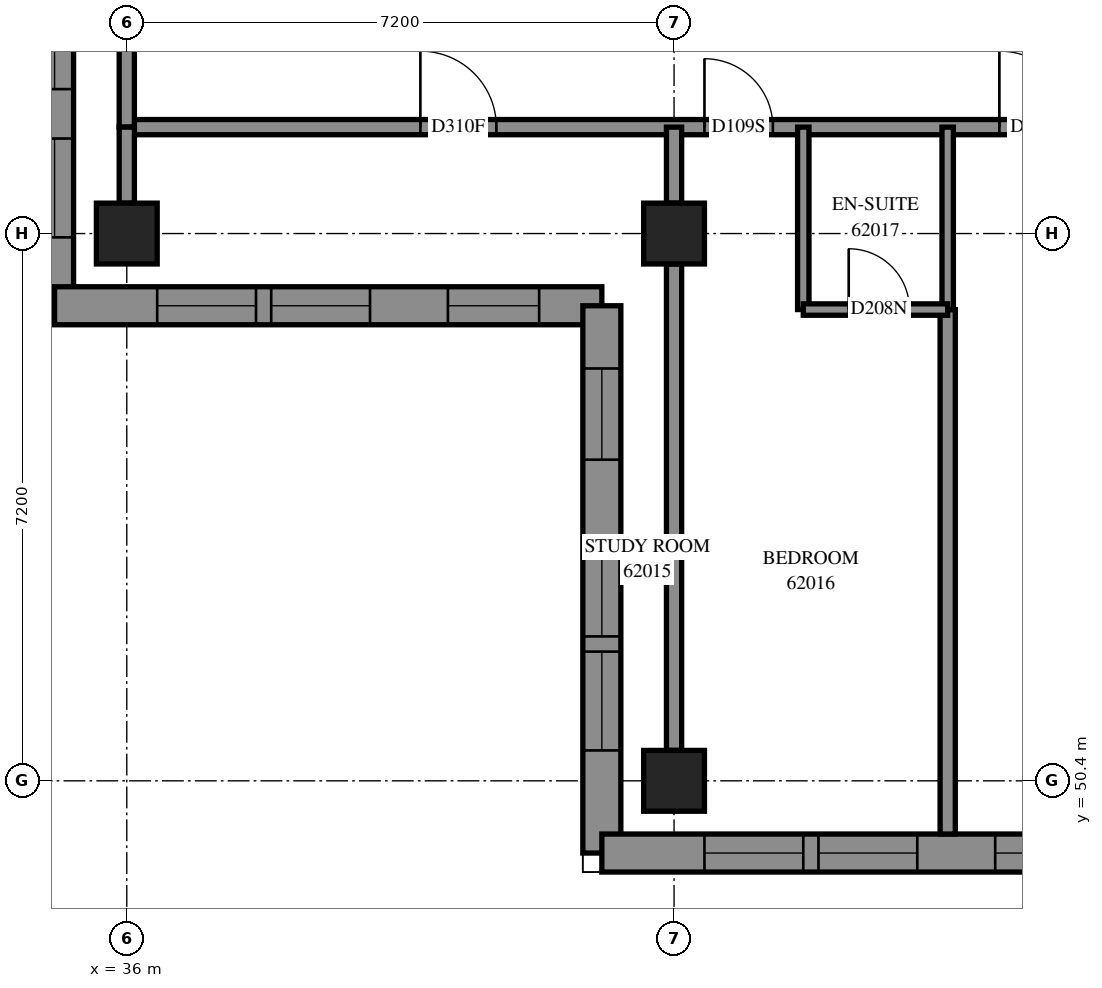
"""IFC4 building model, lengths in metres.
Left out: names, types, materials, properties, quantities, classifications, styles, units other than length and angle.
Written with IfcOpenShell. Run it as: python <this file> out.ifc"""

import sys

from ifc_helpers import new_model, si_unit, direction, frame, frame_2d, origin, origin_2d, place, context, subcontext, project, spatial, polyline, rectangle, outline, extrude, element, fill, save


model = new_model("IFC4")
c1 = context("Model", 3, precision=1e-05, world=origin(), true_north=direction((0.0, 1.0)))
c2 = subcontext(c1, "Body", "Model", "MODEL_VIEW")
j1 = project(units=[si_unit("LENGTHUNIT", "METRE"), si_unit("PLANEANGLEUNIT", "RADIAN")], contexts=[c1])
p1 = place(None, origin())
s1 = spatial("IfcSite", under=j1, at=p1, CompositionType="ELEMENT")
p2 = place(p1, origin())
s2 = spatial("IfcBuilding", under=s1, at=p2, CompositionType="ELEMENT")
p3 = place(p2, frame((0.0, 0.0, 227.0)))
s3 = spatial("IfcBuildingStorey", under=s2, at=p3, CompositionType="ELEMENT", Elevation=227.0)
for number, where, z_axis, x_axis in (
    (1, (36.0, 57.6, 0.0), (0.0, 0.0, 1.0), (1.0, 0.0, 0.0)),
    (2, (43.2, 50.4, 0.0), (0.0, 0.0, 1.0), (1.0, 0.0, 0.0)),
    (3, (43.2, 57.6, 0.0), (0.0, 0.0, 1.0), (1.0, 0.0, 0.0)),
):
    element("IfcColumn", number, at=place(p3, frame(where, z_axis=z_axis, x_axis=x_axis)), inside=s3, PredefinedType="COLUMN", context=c2, shape_type="SweptSolid", body=[
        extrude(rectangle(XDim=0.8, YDim=0.8, at=origin_2d()), origin(), (0.0, 0.0, 1.0), 3.1),
    ])
p4 = place(p3, frame((35.05, 63.85, 0.0), z_axis=(0.0, 0.0, 1.0), x_axis=(0.0, -1.0, 0.0)))
e4 = element("IfcWall", 4, at=p4, inside=s3, PredefinedType="SOLIDWALL", context=c2, shape_type="SweptSolid", body=[
    extrude(outline(polyline([(0.25, -0.25), (7.45, -0.25), (6.95, 0.25), (-0.25, 0.25), (0.25, -0.25)])), origin(), (0.0, 0.0, 1.0), 3.1),
])
p5 = place(p4, frame((3.05, 0.0, 0.45)))
e5 = element("IfcOpeningElement", 5, at=p5, cuts=e4, PredefinedType="OPENING", context=c2, shape_type="SweptSolid", body=[
    extrude(rectangle(XDim=1.3, YDim=2.5, at=frame_2d((0.65, 1.25))), frame((0.0, 0.26, 0.0), z_axis=(0.0, -1.0, 0.0), x_axis=(1.0, 0.0, 0.0)), (0.0, 0.0, 1.0), 0.52),
])
p6 = place(p4, frame((5.0, 0.0, 0.45)))
e6 = element("IfcOpeningElement", 6, at=p6, cuts=e4, PredefinedType="OPENING", context=c2, shape_type="SweptSolid", body=[
    extrude(rectangle(XDim=1.3, YDim=2.5, at=frame_2d((0.65, 1.25))), frame((0.0, 0.26, 0.0), z_axis=(0.0, -1.0, 0.0), x_axis=(1.0, 0.0, 0.0)), (0.0, 0.0, 1.0), 0.52),
])
p7 = place(p4, frame((0.825, 0.0, 0.45)))
e7 = element("IfcOpeningElement", 7, at=p7, cuts=e4, PredefinedType="OPENING", context=c2, shape_type="SweptSolid", body=[
    extrude(rectangle(XDim=1.2, YDim=2.5, at=frame_2d((0.6, 1.25))), frame((0.0, 0.26, 0.0), z_axis=(0.0, -1.0, 0.0), x_axis=(1.0, 0.0, 0.0)), (0.0, 0.0, 1.0), 0.52),
])
p8 = place(p3, frame((35.05, 56.65, 0.0), z_axis=(0.0, 0.0, 1.0), x_axis=(1.0, 0.0, 0.0)))
e8 = element("IfcWall", 8, at=p8, inside=s3, PredefinedType="SOLIDWALL", context=c2, shape_type="SweptSolid", body=[
    extrude(outline(polyline([(-0.25, -0.25), (6.95, -0.25), (7.45, 0.25), (0.25, 0.25), (-0.25, -0.25)])), origin(), (0.0, 0.0, 1.0), 3.1),
])
p9 = place(p8, frame((1.35, 0.0, 0.45)))
e9 = element("IfcOpeningElement", 9, at=p9, cuts=e8, PredefinedType="OPENING", context=c2, shape_type="SweptSolid", body=[
    extrude(rectangle(XDim=1.3, YDim=2.5, at=frame_2d((0.65, 1.25))), frame((0.0, 0.26, 0.0), z_axis=(0.0, -1.0, 0.0), x_axis=(1.0, 0.0, 0.0)), (0.0, 0.0, 1.0), 0.52),
])
p10 = place(p8, frame((2.85, 0.0, 0.45)))
e10 = element("IfcOpeningElement", 10, at=p10, cuts=e8, PredefinedType="OPENING", context=c2, shape_type="SweptSolid", body=[
    extrude(rectangle(XDim=1.3, YDim=2.5, at=frame_2d((0.65, 1.25))), frame((0.0, 0.26, 0.0), z_axis=(0.0, -1.0, 0.0), x_axis=(1.0, 0.0, 0.0)), (0.0, 0.0, 1.0), 0.52),
])
p11 = place(p8, frame((5.175, 0.0, 0.45)))
e11 = element("IfcOpeningElement", 11, at=p11, cuts=e8, PredefinedType="OPENING", context=c2, shape_type="SweptSolid", body=[
    extrude(rectangle(XDim=1.2, YDim=2.5, at=frame_2d((0.6, 1.25))), frame((0.0, 0.26, 0.0), z_axis=(0.0, -1.0, 0.0), x_axis=(1.0, 0.0, 0.0)), (0.0, 0.0, 1.0), 0.52),
])
p12 = place(p3, frame((42.25, 56.65, 0.0), z_axis=(0.0, 0.0, 1.0), x_axis=(0.0, -1.0, 0.0)))
e12 = element("IfcWall", 12, at=p12, inside=s3, PredefinedType="SOLIDWALL", context=c2, shape_type="SweptSolid", body=[
    extrude(outline(polyline([(0.25, -0.25), (7.45, -0.25), (6.95, 0.25), (-0.25, 0.25), (0.25, -0.25)])), origin(), (0.0, 0.0, 1.0), 3.1),
])
p13 = place(p12, frame((3.05, 0.0, 0.45)))
e13 = element("IfcOpeningElement", 13, at=p13, cuts=e12, PredefinedType="OPENING", context=c2, shape_type="SweptSolid", body=[
    extrude(rectangle(XDim=1.3, YDim=2.5, at=frame_2d((0.65, 1.25))), frame((0.0, 0.26, 0.0), z_axis=(0.0, -1.0, 0.0), x_axis=(1.0, 0.0, 0.0)), (0.0, 0.0, 1.0), 0.52),
])
p14 = place(p12, frame((4.55, 0.0, 0.45)))
e14 = element("IfcOpeningElement", 14, at=p14, cuts=e12, PredefinedType="OPENING", context=c2, shape_type="SweptSolid", body=[
    extrude(rectangle(XDim=1.3, YDim=2.5, at=frame_2d((0.65, 1.25))), frame((0.0, 0.26, 0.0), z_axis=(0.0, -1.0, 0.0), x_axis=(1.0, 0.0, 0.0)), (0.0, 0.0, 1.0), 0.52),
])
p15 = place(p12, frame((0.825, 0.0, 0.45)))
e15 = element("IfcOpeningElement", 15, at=p15, cuts=e12, PredefinedType="OPENING", context=c2, shape_type="SweptSolid", body=[
    extrude(rectangle(XDim=1.2, YDim=2.5, at=frame_2d((0.6, 1.25))), frame((0.0, 0.26, 0.0), z_axis=(0.0, -1.0, 0.0), x_axis=(1.0, 0.0, 0.0)), (0.0, 0.0, 1.0), 0.52),
])
p16 = place(p3, frame((42.25, 49.45, 0.0), z_axis=(0.0, 0.0, 1.0), x_axis=(1.0, 0.0, 0.0)))
e16 = element("IfcWall", 16, at=p16, inside=s3, PredefinedType="SOLIDWALL", context=c2, shape_type="SweptSolid", body=[
    extrude(outline(polyline([(-0.25, -0.25), (6.95, -0.25), (7.45, 0.25), (0.25, 0.25), (-0.25, -0.25)])), origin(), (0.0, 0.0, 1.0), 3.1),
])
p17 = place(p16, frame((1.35, 0.0, 0.45)))
e17 = element("IfcOpeningElement", 17, at=p17, cuts=e16, PredefinedType="OPENING", context=c2, shape_type="SweptSolid", body=[
    extrude(rectangle(XDim=1.3, YDim=2.5, at=frame_2d((0.65, 1.25))), frame((0.0, 0.26, 0.0), z_axis=(0.0, -1.0, 0.0), x_axis=(1.0, 0.0, 0.0)), (0.0, 0.0, 1.0), 0.52),
])
p18 = place(p16, frame((2.85, 0.0, 0.45)))
e18 = element("IfcOpeningElement", 18, at=p18, cuts=e16, PredefinedType="OPENING", context=c2, shape_type="SweptSolid", body=[
    extrude(rectangle(XDim=1.3, YDim=2.5, at=frame_2d((0.65, 1.25))), frame((0.0, 0.26, 0.0), z_axis=(0.0, -1.0, 0.0), x_axis=(1.0, 0.0, 0.0)), (0.0, 0.0, 1.0), 0.52),
])
p19 = place(p16, frame((5.175, 0.0, 0.45)))
e19 = element("IfcOpeningElement", 19, at=p19, cuts=e16, PredefinedType="OPENING", context=c2, shape_type="SweptSolid", body=[
    extrude(rectangle(XDim=1.2, YDim=2.5, at=frame_2d((0.6, 1.25))), frame((0.0, 0.26, 0.0), z_axis=(0.0, -1.0, 0.0), x_axis=(1.0, 0.0, 0.0)), (0.0, 0.0, 1.0), 0.52),
])
p20 = place(p3, frame((36.0, 59.0, 0.0), z_axis=(0.0, 0.0, 1.0), x_axis=(1.0, 0.0, 0.0)))
e20 = element("IfcWall", 20, at=p20, inside=s3, PredefinedType="PARTITIONING", context=c2, shape_type="SweptSolid", body=[
    extrude(rectangle(XDim=17.0, YDim=0.2, at=frame_2d((8.5, 0.0))), origin(), (0.0, 0.0, 1.0), 3.1),
])
p21 = place(p20, frame((3.862, 0.0, 0.0)))
e21 = element("IfcOpeningElement", 21, at=p21, cuts=e20, PredefinedType="OPENING", context=c2, shape_type="SweptSolid", body=[
    extrude(rectangle(XDim=1.0, YDim=2.1, at=frame_2d((0.5, 1.05))), frame((0.0, 0.11, 0.0), z_axis=(0.0, -1.0, 0.0), x_axis=(1.0, 0.0, 0.0)), (0.0, 0.0, 1.0), 0.22),
])
p22 = place(p20, frame((7.6, 0.0, 0.0)))
e22 = element("IfcOpeningElement", 22, at=p22, cuts=e20, PredefinedType="OPENING", context=c2, shape_type="SweptSolid", body=[
    extrude(rectangle(XDim=0.9, YDim=2.1, at=frame_2d((0.45, 1.05))), frame((0.0, 0.11, 0.0), z_axis=(0.0, -1.0, 0.0), x_axis=(1.0, 0.0, 0.0)), (0.0, 0.0, 1.0), 0.22),
])
p23 = place(p20, frame((11.48, 0.0, 0.0)))
e23 = element("IfcOpeningElement", 23, at=p23, cuts=e20, PredefinedType="OPENING", context=c2, shape_type="SweptSolid", body=[
    extrude(rectangle(XDim=1.0, YDim=2.1, at=frame_2d((0.5, 1.05))), frame((0.0, 0.11, 0.0), z_axis=(0.0, -1.0, 0.0), x_axis=(1.0, 0.0, 0.0)), (0.0, 0.0, 1.0), 0.22),
])
p24 = place(p20, frame((15.805, 0.0, 0.0)))
e24 = element("IfcOpeningElement", 24, at=p24, cuts=e20, PredefinedType="OPENING", context=c2, shape_type="SweptSolid", body=[
    extrude(rectangle(XDim=1.0, YDim=2.1, at=frame_2d((0.5, 1.05))), frame((0.0, 0.11, 0.0), z_axis=(0.0, -1.0, 0.0), x_axis=(1.0, 0.0, 0.0)), (0.0, 0.0, 1.0), 0.22),
])
p25 = place(p3, frame((46.8, 49.7, 0.0), z_axis=(0.0, 0.0, 1.0), x_axis=(0.0, 1.0, 0.0)))
e25 = element("IfcWall", 25, at=p25, inside=s3, PredefinedType="PARTITIONING", context=c2, shape_type="SweptSolid", body=[
    extrude(rectangle(XDim=6.9, YDim=0.2, at=frame_2d((3.45, 0.0))), origin(), (0.0, 0.0, 1.0), 3.1),
])
p26 = place(p3, frame((43.2, 50.8, 0.0), z_axis=(0.0, 0.0, 1.0), x_axis=(0.0, 1.0, 0.0)))
e26 = element("IfcWall", 26, at=p26, inside=s3, PredefinedType="PARTITIONING", context=c2, shape_type="SweptSolid", body=[
    extrude(rectangle(XDim=6.4, YDim=0.2, at=frame_2d((3.2, 0.0))), origin(), (0.0, 0.0, 1.0), 2.6),
])
for number, where, z_axis, x_axis in (
    (27, (44.9, 56.6, 0.0), (0.0, 0.0, 1.0), (0.0, 1.0, 0.0)),
    (28, (46.8, 56.6, 0.0), (0.0, 0.0, 1.0), (0.0, 1.0, 0.0)),
):
    element("IfcWall", number, at=place(p3, frame(where, z_axis=z_axis, x_axis=x_axis)), inside=s3, PredefinedType="PARTITIONING", context=c2, shape_type="SweptSolid", body=[
        extrude(rectangle(XDim=2.4, YDim=0.15, at=frame_2d((1.2, 0.0))), origin(), (0.0, 0.0, 1.0), 3.1),
    ])
p27 = place(p3, frame((36.0, 59.0, 0.0), z_axis=(0.0, 0.0, 1.0), x_axis=(0.0, 1.0, 0.0)))
e29 = element("IfcWall", 29, at=p27, inside=s3, PredefinedType="PARTITIONING", context=c2, shape_type="SweptSolid", body=[
    extrude(rectangle(XDim=2.0, YDim=0.2, at=frame_2d((1.0, 0.0))), origin(), (0.0, 0.0, 1.0), 2.6),
])
p28 = place(p3, frame((44.9, 56.6, 0.0), z_axis=(0.0, 0.0, 1.0), x_axis=(1.0, 0.0, 0.0)))
e30 = element("IfcWall", 30, at=p28, inside=s3, PredefinedType="PARTITIONING", context=c2, shape_type="SweptSolid", body=[
    extrude(rectangle(XDim=1.9, YDim=0.15, at=frame_2d((0.95, 0.0))), origin(), (0.0, 0.0, 1.0), 3.1),
])
p29 = place(p28, frame((0.598, 0.0, 0.0)))
e31 = element("IfcOpeningElement", 31, at=p29, cuts=e30, PredefinedType="OPENING", context=c2, shape_type="SweptSolid", body=[
    extrude(rectangle(XDim=0.8, YDim=2.1, at=frame_2d((0.4, 1.05))), frame((0.0, 0.085, 0.0), z_axis=(0.0, -1.0, 0.0), x_axis=(1.0, 0.0, 0.0)), (0.0, 0.0, 1.0), 0.17),
])
p30 = place(p3, frame((36.0, 58.0, 0.0), z_axis=(0.0, 0.0, 1.0), x_axis=(0.0, 1.0, 0.0)))
e32 = element("IfcWall", 32, at=p30, inside=s3, PredefinedType="PARTITIONING", context=c2, shape_type="SweptSolid", body=[
    extrude(rectangle(XDim=1.0, YDim=0.2, at=frame_2d((0.5, 0.0))), origin(), (0.0, 0.0, 1.0), 2.6),
])
p31 = place(p3, frame((43.2, 58.0, 0.0), z_axis=(0.0, 0.0, 1.0), x_axis=(0.0, 1.0, 0.0)))
e33 = element("IfcWall", 33, at=p31, inside=s3, PredefinedType="PARTITIONING", context=c2, shape_type="SweptSolid", body=[
    extrude(rectangle(XDim=1.0, YDim=0.2, at=frame_2d((0.5, 0.0))), origin(), (0.0, 0.0, 1.0), 3.1),
])
p32 = place(p5, origin())
e34 = element("IfcWindow", 34, at=p32, inside=s3, PartitioningType="SINGLE_PANEL", PredefinedType="WINDOW", context=c2, shape_type="SweptSolid", body=[
    extrude(rectangle(XDim=1.3, YDim=2.5, at=frame_2d((0.65, 1.25))), frame((0.0, 0.18, 0.0), z_axis=(0.0, -1.0, 0.0), x_axis=(1.0, 0.0, 0.0)), (0.0, 0.0, 1.0), 0.06),
])
fill(e5, e34)
p33 = place(p6, origin())
e35 = element("IfcWindow", 35, at=p33, inside=s3, PartitioningType="SINGLE_PANEL", PredefinedType="WINDOW", context=c2, shape_type="SweptSolid", body=[
    extrude(rectangle(XDim=1.3, YDim=2.5, at=frame_2d((0.65, 1.25))), frame((0.0, 0.18, 0.0), z_axis=(0.0, -1.0, 0.0), x_axis=(1.0, 0.0, 0.0)), (0.0, 0.0, 1.0), 0.06),
])
fill(e6, e35)
p34 = place(p9, origin())
e36 = element("IfcWindow", 36, at=p34, inside=s3, PartitioningType="SINGLE_PANEL", PredefinedType="WINDOW", context=c2, shape_type="SweptSolid", body=[
    extrude(rectangle(XDim=1.3, YDim=2.5, at=frame_2d((0.65, 1.25))), frame((0.0, 0.18, 0.0), z_axis=(0.0, -1.0, 0.0), x_axis=(1.0, 0.0, 0.0)), (0.0, 0.0, 1.0), 0.06),
])
fill(e9, e36)
p35 = place(p10, origin())
e37 = element("IfcWindow", 37, at=p35, inside=s3, PartitioningType="SINGLE_PANEL", PredefinedType="WINDOW", context=c2, shape_type="SweptSolid", body=[
    extrude(rectangle(XDim=1.3, YDim=2.5, at=frame_2d((0.65, 1.25))), frame((0.0, 0.18, 0.0), z_axis=(0.0, -1.0, 0.0), x_axis=(1.0, 0.0, 0.0)), (0.0, 0.0, 1.0), 0.06),
])
fill(e10, e37)
p36 = place(p11, origin())
e38 = element("IfcWindow", 38, at=p36, inside=s3, PartitioningType="SINGLE_PANEL", PredefinedType="WINDOW", context=c2, shape_type="SweptSolid", body=[
    extrude(rectangle(XDim=1.2, YDim=2.5, at=frame_2d((0.6, 1.25))), frame((0.0, 0.18, 0.0), z_axis=(0.0, -1.0, 0.0), x_axis=(1.0, 0.0, 0.0)), (0.0, 0.0, 1.0), 0.06),
])
fill(e11, e38)
p37 = place(p13, origin())
e39 = element("IfcWindow", 39, at=p37, inside=s3, PartitioningType="SINGLE_PANEL", PredefinedType="WINDOW", context=c2, shape_type="SweptSolid", body=[
    extrude(rectangle(XDim=1.3, YDim=2.5, at=frame_2d((0.65, 1.25))), frame((0.0, 0.18, 0.0), z_axis=(0.0, -1.0, 0.0), x_axis=(1.0, 0.0, 0.0)), (0.0, 0.0, 1.0), 0.06),
])
fill(e13, e39)
p38 = place(p14, origin())
e40 = element("IfcWindow", 40, at=p38, inside=s3, PartitioningType="SINGLE_PANEL", PredefinedType="WINDOW", context=c2, shape_type="SweptSolid", body=[
    extrude(rectangle(XDim=1.3, YDim=2.5, at=frame_2d((0.65, 1.25))), frame((0.0, 0.18, 0.0), z_axis=(0.0, -1.0, 0.0), x_axis=(1.0, 0.0, 0.0)), (0.0, 0.0, 1.0), 0.06),
])
fill(e14, e40)
p39 = place(p15, origin())
e41 = element("IfcWindow", 41, at=p39, inside=s3, PartitioningType="SINGLE_PANEL", PredefinedType="WINDOW", context=c2, shape_type="SweptSolid", body=[
    extrude(rectangle(XDim=1.2, YDim=2.5, at=frame_2d((0.6, 1.25))), frame((0.0, 0.18, 0.0), z_axis=(0.0, -1.0, 0.0), x_axis=(1.0, 0.0, 0.0)), (0.0, 0.0, 1.0), 0.06),
])
fill(e15, e41)
p40 = place(p17, origin())
e42 = element("IfcWindow", 42, at=p40, inside=s3, PartitioningType="SINGLE_PANEL", PredefinedType="WINDOW", context=c2, shape_type="SweptSolid", body=[
    extrude(rectangle(XDim=1.3, YDim=2.5, at=frame_2d((0.65, 1.25))), frame((0.0, 0.18, 0.0), z_axis=(0.0, -1.0, 0.0), x_axis=(1.0, 0.0, 0.0)), (0.0, 0.0, 1.0), 0.06),
])
fill(e17, e42)
p41 = place(p18, origin())
e43 = element("IfcWindow", 43, at=p41, inside=s3, PartitioningType="SINGLE_PANEL", PredefinedType="WINDOW", context=c2, shape_type="SweptSolid", body=[
    extrude(rectangle(XDim=1.3, YDim=2.5, at=frame_2d((0.65, 1.25))), frame((0.0, 0.18, 0.0), z_axis=(0.0, -1.0, 0.0), x_axis=(1.0, 0.0, 0.0)), (0.0, 0.0, 1.0), 0.06),
])
fill(e18, e43)
p42 = place(p19, origin())
e44 = element("IfcWindow", 44, at=p42, inside=s3, PartitioningType="SINGLE_PANEL", PredefinedType="WINDOW", context=c2, shape_type="SweptSolid", body=[
    extrude(rectangle(XDim=1.2, YDim=2.5, at=frame_2d((0.6, 1.25))), frame((0.0, 0.18, 0.0), z_axis=(0.0, -1.0, 0.0), x_axis=(1.0, 0.0, 0.0)), (0.0, 0.0, 1.0), 0.06),
])
fill(e19, e44)
p43 = place(p21, origin())
e45 = element("IfcDoor", 45, at=p43, inside=s3, OperationType="SINGLE_SWING_LEFT", PredefinedType="DOOR", context=c2, shape_type="SweptSolid", body=[
    extrude(rectangle(XDim=1.0, YDim=2.1, at=frame_2d((0.5, 1.05))), frame((0.0, 0.025, 0.0), z_axis=(0.0, -1.0, 0.0), x_axis=(1.0, 0.0, 0.0)), (0.0, 0.0, 1.0), 0.05),
])
fill(e21, e45)
p44 = place(p22, origin())
e46 = element("IfcDoor", 46, at=p44, inside=s3, OperationType="SINGLE_SWING_LEFT", PredefinedType="DOOR", context=c2, shape_type="SweptSolid", body=[
    extrude(rectangle(XDim=0.9, YDim=2.1, at=frame_2d((0.45, 1.05))), frame((0.0, 0.025, 0.0), z_axis=(0.0, -1.0, 0.0), x_axis=(1.0, 0.0, 0.0)), (0.0, 0.0, 1.0), 0.05),
])
fill(e22, e46)
p45 = place(p29, origin())
e47 = element("IfcDoor", 47, at=p45, inside=s3, OperationType="SINGLE_SWING_RIGHT", PredefinedType="DOOR", context=c2, shape_type="SweptSolid", body=[
    extrude(rectangle(XDim=0.8, YDim=2.1, at=frame_2d((0.4, 1.05))), frame((0.0, 0.025, 0.0), z_axis=(0.0, -1.0, 0.0), x_axis=(1.0, 0.0, 0.0)), (0.0, 0.0, 1.0), 0.05),
])
fill(e31, e47)
p46 = place(p23, origin())
e48 = element("IfcDoor", 48, at=p46, inside=s3, OperationType="SINGLE_SWING_RIGHT", PredefinedType="DOOR", context=c2, shape_type="SweptSolid", body=[
    extrude(rectangle(XDim=1.0, YDim=2.1, at=frame_2d((0.5, 1.05))), frame((0.0, 0.025, 0.0), z_axis=(0.0, -1.0, 0.0), x_axis=(1.0, 0.0, 0.0)), (0.0, 0.0, 1.0), 0.05),
])
fill(e23, e48)
save(model, sys.argv[1])
